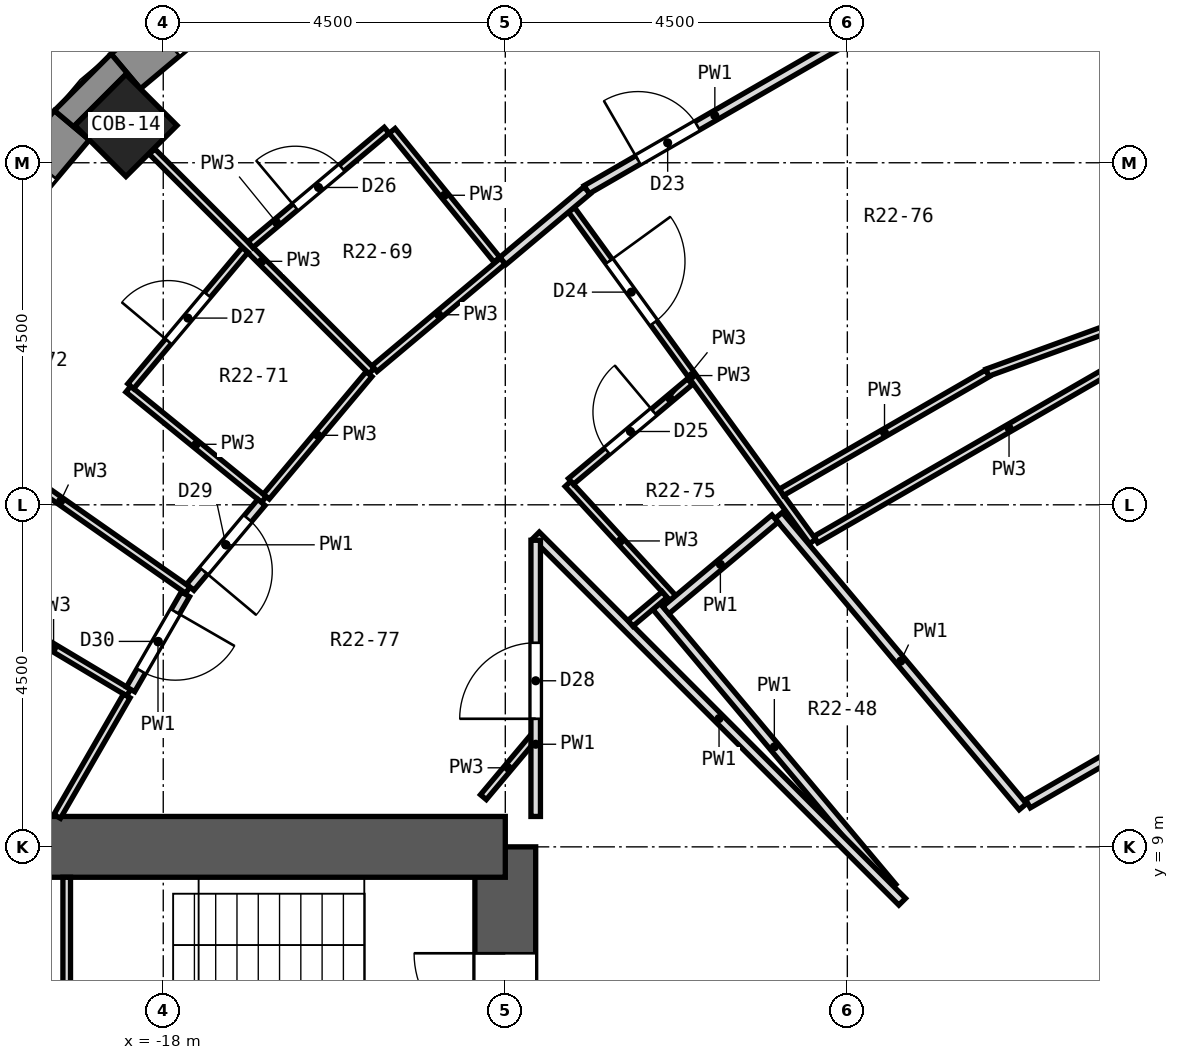
"""IFC4 building model, lengths in metres.
Left out: names, types, materials, properties, quantities, classifications, styles, units other than length and angle.
Written with IfcOpenShell. Run it as: python <this file> out.ifc"""

import sys

from ifc_helpers import new_model, si_unit, direction, frame, frame_2d, origin, origin_2d, place, context, subcontext, project, spatial, polyline, rectangle, outline, extrude, element, fill, save


model = new_model("IFC4")
c1 = context("Model", 3, precision=1e-05, world=origin(), true_north=direction((0.0, 1.0)))
c2 = subcontext(c1, "Body", "Model", "MODEL_VIEW")
j1 = project(units=[si_unit("LENGTHUNIT", "METRE"), si_unit("PLANEANGLEUNIT", "RADIAN")], contexts=[c1])
p1 = place(None, origin())
s1 = spatial("IfcSite", under=j1, at=p1, CompositionType="ELEMENT")
p2 = place(p1, origin())
s2 = spatial("IfcBuilding", under=s1, at=p2, CompositionType="ELEMENT")
p3 = place(p2, frame((0.0, 0.0, 141.4)))
s3 = spatial("IfcBuildingStorey", under=s2, at=p3, CompositionType="ELEMENT", Elevation=141.4)
p4 = place(p3, frame((-18.491, 18.491, 0.0), z_axis=(0.0, 0.0, 1.0), x_axis=(-0.707106781187, 0.707106781187, 0.0)))
e1 = element("IfcColumn", 1, at=p4, inside=s3, PredefinedType="COLUMN", context=c2, shape_type="SweptSolid", body=[
    extrude(rectangle(XDim=0.95, YDim=0.95, at=origin_2d()), origin(), (0.0, 0.0, 1.0), 3.3),
])
p5 = place(p3, frame((-13.5, -9.0, 0.0), z_axis=(0.0, 0.0, 1.0), x_axis=(0.0, 1.0, 0.0)))
e2 = element("IfcWall", 2, at=p5, inside=s3, PredefinedType="SHEAR", context=c2, shape_type="SweptSolid", body=[
    extrude(rectangle(XDim=18.0, YDim=0.8, at=frame_2d((9.0, 0.0))), origin(), (0.0, 0.0, 1.0), 3.3),
])
p6 = place(p5, frame((15.4, 0.0, 0.0)))
e3 = element("IfcOpeningElement", 3, at=p6, cuts=e2, PredefinedType="OPENING", context=c2, shape_type="SweptSolid", body=[
    extrude(rectangle(XDim=1.2, YDim=2.1, at=frame_2d((0.6, 1.05))), frame((0.0, 0.412, 0.0), z_axis=(0.0, -1.0, 0.0), x_axis=(1.0, 0.0, 0.0)), (0.0, 0.0, 1.0), 0.824),
])
p7 = place(p5, frame((1.4, 0.0, 0.0)))
e4 = element("IfcOpeningElement", 4, at=p7, cuts=e2, PredefinedType="OPENING", context=c2, shape_type="SweptSolid", body=[
    extrude(rectangle(XDim=1.2, YDim=2.1, at=frame_2d((0.6, 1.05))), frame((0.0, 0.412, 0.0), z_axis=(0.0, -1.0, 0.0), x_axis=(1.0, 0.0, 0.0)), (0.0, 0.0, 1.0), 0.824),
])
p8 = place(p5, frame((7.5, 0.0, 0.0)))
e5 = element("IfcOpeningElement", 5, at=p8, cuts=e2, PredefinedType="OPENING", context=c2, shape_type="SweptSolid", body=[
    extrude(rectangle(XDim=3.0, YDim=2.4, at=frame_2d((1.5, 1.2))), frame((0.0, 0.412, 0.0), z_axis=(0.0, -1.0, 0.0), x_axis=(1.0, 0.0, 0.0)), (0.0, 0.0, 1.0), 0.824),
])
p9 = place(p3, frame((-13.5, 9.0, 0.0), z_axis=(0.0, 0.0, 1.0), x_axis=(-1.0, 0.0, 0.0)))
e6 = element("IfcWall", 6, at=p9, inside=s3, PredefinedType="SHEAR", context=c2, shape_type="SweptSolid", body=[
    extrude(rectangle(XDim=10.4, YDim=0.8, at=frame_2d((5.2, 0.0))), origin(), (0.0, 0.0, 1.0), 3.3),
])
p10 = place(p3, frame((-15.699, 21.547, 0.0), z_axis=(0.0, 0.0, 1.0), x_axis=(-0.766055462616, -0.642774476932, 0.0)))
e7 = element("IfcWall", 7, at=p10, inside=s3, PredefinedType="SOLIDWALL", context=c2, shape_type="SweptSolid", body=[
    extrude(rectangle(XDim=3.648, YDim=0.6, at=frame_2d((1.824, 0.0))), origin(), (0.0, 0.0, 1.0), 2.8),
])
p11 = place(p10, frame((0.674, 0.0, 0.9)))
e8 = element("IfcOpeningElement", 8, at=p11, cuts=e7, PredefinedType="OPENING", context=c2, shape_type="SweptSolid", body=[
    extrude(rectangle(XDim=2.3, YDim=1.8, at=frame_2d((1.15, 0.9))), frame((0.0, 0.312, 0.0), z_axis=(0.0, -1.0, 0.0), x_axis=(1.0, 0.0, 0.0)), (0.0, 0.0, 1.0), 0.624),
])
p12 = place(p3, frame((-19.202, 18.494, 0.0), z_axis=(0.0, 0.0, 1.0), x_axis=(-0.642774476932, -0.766055462616, 0.0)))
e9 = element("IfcWall", 9, at=p12, inside=s3, PredefinedType="SOLIDWALL", context=c2, shape_type="SweptSolid", body=[
    extrude(rectangle(XDim=3.648, YDim=0.6, at=frame_2d((1.824, 0.0))), origin(), (0.0, 0.0, 1.0), 2.8),
])
p13 = place(p12, frame((0.674, 0.0, 0.9)))
e10 = element("IfcOpeningElement", 10, at=p13, cuts=e9, PredefinedType="OPENING", context=c2, shape_type="SweptSolid", body=[
    extrude(rectangle(XDim=2.3, YDim=1.8, at=frame_2d((1.15, 0.9))), frame((0.0, 0.312, 0.0), z_axis=(0.0, -1.0, 0.0), x_axis=(1.0, 0.0, 0.0)), (0.0, 0.0, 1.0), 0.624),
])
p14 = place(p3, origin())
e11 = element("IfcWall", 11, at=p14, inside=s3, PredefinedType="SOLIDWALL", context=c2, shape_type="SweptSolid", body=[
    extrude(outline(polyline([(-18.686, 19.432), (-19.432, 18.686), (-18.972, 18.301), (-19.163, 18.491), (-18.491, 19.163), (-18.301, 18.972), (-18.686, 19.432)])), origin(), (0.0, 0.0, 1.0), 2.8),
])
p15 = place(p3, frame((-2.527, 8.125, 0.0), z_axis=(0.0, 0.0, 1.0), x_axis=(-0.86604563398, -0.499964958637, 0.0)))
e12 = element("IfcWall", 12, at=p15, inside=s3, PredefinedType="SOLIDWALL", context=c2, shape_type="SweptSolid", body=[
    extrude(rectangle(XDim=3.747, YDim=0.6, at=frame_2d((1.874, 0.0))), origin(), (0.0, 0.0, 1.0), 2.8),
])
p16 = place(p15, frame((0.674, 0.0, 0.9)))
e13 = element("IfcOpeningElement", 13, at=p16, cuts=e12, PredefinedType="OPENING", context=c2, shape_type="SweptSolid", body=[
    extrude(rectangle(XDim=2.4, YDim=1.8, at=frame_2d((1.2, 0.9))), frame((0.0, 0.312, 0.0), z_axis=(0.0, -1.0, 0.0), x_axis=(1.0, 0.0, 0.0)), (0.0, 0.0, 1.0), 0.624),
])
p17 = place(p3, frame((-6.643, 24.791, 0.0), z_axis=(0.0, 0.0, 1.0), x_axis=(0.258629569049, -0.965976576328, 0.0)))
e14 = element("IfcWall", 14, at=p17, inside=s3, PredefinedType="PARTITIONING", context=c2, shape_type="SweptSolid", body=[
    extrude(rectangle(XDim=8.784, YDim=0.15, at=frame_2d((4.392, 0.0))), origin(), (0.0, 0.0, 1.0), 2.8),
])
p18 = place(p3, frame((-12.629, 17.382, 0.0), z_axis=(0.0, 0.0, 1.0), x_axis=(0.587934886014, -0.808908257967, 0.0)))
e15 = element("IfcWall", 15, at=p18, inside=s3, PredefinedType="PARTITIONING", context=c2, shape_type="SweptSolid", body=[
    extrude(rectangle(XDim=5.395, YDim=0.1, at=frame_2d((2.698, 0.0))), origin(), (0.0, 0.0, 1.0), 2.8),
])
p19 = place(p18, frame((0.84, 0.0, 0.0)))
e16 = element("IfcOpeningElement", 16, at=p19, cuts=e15, PredefinedType="OPENING", context=c2, shape_type="SweptSolid", body=[
    extrude(rectangle(XDim=1.0, YDim=2.1, at=frame_2d((0.5, 1.05))), frame((0.0, 0.062, 0.0), z_axis=(0.0, -1.0, 0.0), x_axis=(1.0, 0.0, 0.0)), (0.0, 0.0, 1.0), 0.124),
])
p20 = place(p3, frame((-14.989, 18.419, 0.0), z_axis=(0.0, 0.0, 1.0), x_axis=(0.63124481093, -0.775583643893, 0.0)))
e17 = element("IfcWall", 17, at=p20, inside=s3, PredefinedType="PARTITIONING", context=c2, shape_type="SweptSolid", body=[
    extrude(rectangle(XDim=2.184, YDim=0.1, at=frame_2d((1.092, 0.0))), origin(), (0.0, 0.0, 1.0), 2.8),
])
p21 = place(p3, frame((-11.511, 12.164, 0.0), z_axis=(0.0, 0.0, 1.0), x_axis=(0.64269368401, -0.766123246308, 0.0)))
e18 = element("IfcWall", 18, at=p21, inside=s3, PredefinedType="PARTITIONING", context=c2, shape_type="SweptSolid", body=[
    extrude(rectangle(XDim=4.826, YDim=0.125, at=frame_2d((2.413, 0.0))), origin(), (0.0, 0.0, 1.0), 2.8),
])
p22 = place(p3, frame((-9.904, 13.359, 0.0), z_axis=(0.0, 0.0, 1.0), x_axis=(0.64260671374, -0.766196196451, 0.0)))
e19 = element("IfcWall", 19, at=p22, inside=s3, PredefinedType="PARTITIONING", context=c2, shape_type="SweptSolid", body=[
    extrude(rectangle(XDim=5.0, YDim=0.125, at=frame_2d((2.5, 0.0))), origin(), (0.0, 0.0, 1.0), 2.8),
])
p23 = place(p3, frame((-12.675, 13.776, 0.0), z_axis=(0.0, 0.0, 1.0), x_axis=(0.676672647076, -0.736284000029, 0.0)))
e20 = element("IfcWall", 20, at=p23, inside=s3, PredefinedType="PARTITIONING", context=c2, shape_type="SweptSolid", body=[
    extrude(rectangle(XDim=2.04, YDim=0.1, at=frame_2d((1.02, 0.0))), origin(), (0.0, 0.0, 1.0), 2.8),
])
p24 = place(p3, frame((-18.148, 18.148, 0.0), z_axis=(0.0, 0.0, 1.0), x_axis=(0.707106781187, -0.707106781187, 0.0)))
e21 = element("IfcWall", 21, at=p24, inside=s3, PredefinedType="PARTITIONING", context=c2, shape_type="SweptSolid", body=[
    extrude(rectangle(XDim=4.085, YDim=0.1, at=frame_2d((2.043, 0.0))), origin(), (0.0, 0.0, 1.0), 2.8),
])
p25 = place(p3, frame((-13.097, 13.097, 0.0), z_axis=(0.0, 0.0, 1.0), x_axis=(0.707106781187, -0.707106781187, 0.0)))
e22 = element("IfcWall", 22, at=p25, inside=s3, PredefinedType="PARTITIONING", context=c2, shape_type="SweptSolid", body=[
    extrude(rectangle(XDim=6.815, YDim=0.125, at=frame_2d((3.407, 0.0))), origin(), (0.0, 0.0, 1.0), 2.8),
])
p26 = place(p3, frame((-18.46, 15.022, 0.0), z_axis=(0.0, 0.0, 1.0), x_axis=(0.775591007639, -0.6312357633, 0.0)))
e23 = element("IfcWall", 23, at=p26, inside=s3, PredefinedType="PARTITIONING", context=c2, shape_type="SweptSolid", body=[
    extrude(rectangle(XDim=2.3, YDim=0.1, at=frame_2d((1.15, 0.0))), origin(), (0.0, 0.0, 1.0), 2.8),
])
p27 = place(p3, frame((-21.024, 14.721, 0.0), z_axis=(0.0, 0.0, 1.0), x_axis=(0.819108383097, -0.573638785945, 0.0)))
e24 = element("IfcWall", 24, at=p27, inside=s3, PredefinedType="PARTITIONING", context=c2, shape_type="SweptSolid", body=[
    extrude(rectangle(XDim=4.086, YDim=0.1, at=frame_2d((2.043, 0.0))), origin(), (0.0, 0.0, 1.0), 2.8),
])
p28 = place(p3, frame((-20.43, 12.209, 0.0), z_axis=(0.0, 0.0, 1.0), x_axis=(0.858446574718, -0.512902991174, 0.0)))
e25 = element("IfcWall", 25, at=p28, inside=s3, PredefinedType="PARTITIONING", context=c2, shape_type="SweptSolid", body=[
    extrude(rectangle(XDim=2.301, YDim=0.1, at=frame_2d((1.15, 0.0))), origin(), (0.0, 0.0, 1.0), 2.8),
])
p29 = place(p3, frame((-7.161, 15.238, 0.0), z_axis=(0.0, 0.0, 1.0), x_axis=(0.939722354216, 0.341938440346, 0.0)))
e26 = element("IfcWall", 26, at=p29, inside=s3, PredefinedType="PARTITIONING", context=c2, shape_type="SweptSolid", body=[
    extrude(rectangle(XDim=2.909, YDim=0.1, at=frame_2d((1.455, 0.0))), origin(), (0.0, 0.0, 1.0), 2.8),
])
p30 = place(p3, frame((-6.624, 9.567, 0.0), z_axis=(0.0, 0.0, 1.0), x_axis=(0.865978549379, 0.500081145431, 0.0)))
e27 = element("IfcWall", 27, at=p30, inside=s3, PredefinedType="PARTITIONING", context=c2, shape_type="SweptSolid", body=[
    extrude(rectangle(XDim=1.905, YDim=0.125, at=frame_2d((0.953, 0.0))), origin(), (0.0, 0.0, 1.0), 2.8),
])
p31 = place(p3, frame((-9.414, 13.043, 0.0), z_axis=(0.0, 0.0, 1.0), x_axis=(0.866050468633, 0.499956583896, 0.0)))
e28 = element("IfcWall", 28, at=p31, inside=s3, PredefinedType="PARTITIONING", context=c2, shape_type="SweptSolid", body=[
    extrude(rectangle(XDim=5.867, YDim=0.1, at=frame_2d((2.934, 0.0))), origin(), (0.0, 0.0, 1.0), 2.8),
])
p32 = place(p3, frame((-9.866, 13.666, 0.0), z_axis=(0.0, 0.0, 1.0), x_axis=(0.866045268016, 0.499965592563, 0.0)))
e29 = element("IfcWall", 29, at=p32, inside=s3, PredefinedType="PARTITIONING", context=c2, shape_type="SweptSolid", body=[
    extrude(rectangle(XDim=3.129, YDim=0.1, at=frame_2d((1.564, 0.0))), origin(), (0.0, 0.0, 1.0), 2.8),
])
p33 = place(p3, frame((-12.432, 17.645, 0.0), z_axis=(0.0, 0.0, 1.0), x_axis=(0.866012062527, 0.500023107024, 0.0)))
e30 = element("IfcWall", 30, at=p33, inside=s3, PredefinedType="PARTITIONING", context=c2, shape_type="SweptSolid", body=[
    extrude(rectangle(XDim=3.772, YDim=0.125, at=frame_2d((1.886, 0.0))), origin(), (0.0, 0.0, 1.0), 2.8),
])
p34 = place(p33, frame((0.783, 0.0, 0.0)))
e31 = element("IfcOpeningElement", 31, at=p34, cuts=e30, PredefinedType="OPENING", context=c2, shape_type="SweptSolid", body=[
    extrude(rectangle(XDim=0.9, YDim=2.1, at=frame_2d((0.45, 1.05))), frame((0.0, 0.074, 0.0), z_axis=(0.0, -1.0, 0.0), x_axis=(1.0, 0.0, 0.0)), (0.0, 0.0, 1.0), 0.149),
])
p35 = place(p3, frame((-11.388, 12.114, 0.0), z_axis=(0.0, 0.0, 1.0), x_axis=(0.766199817297, 0.642602396489, 0.0)))
e32 = element("IfcWall", 32, at=p35, inside=s3, PredefinedType="PARTITIONING", context=c2, shape_type="SweptSolid", body=[
    extrude(rectangle(XDim=1.875, YDim=0.125, at=frame_2d((0.937, 0.0))), origin(), (0.0, 0.0, 1.0), 2.8),
])
p36 = place(p3, frame((-11.854, 11.941, 0.0), z_axis=(0.0, 0.0, 1.0), x_axis=(0.765622887771, 0.643289665486, 0.0)))
e33 = element("IfcWall", 33, at=p36, inside=s3, PredefinedType="PARTITIONING", context=c2, shape_type="SweptSolid", body=[
    extrude(rectangle(XDim=0.587, YDim=0.1, at=frame_2d((0.293, 0.0))), origin(), (0.0, 0.0, 1.0), 2.8),
])
p37 = place(p3, frame((-12.637, 13.808, 0.0), z_axis=(0.0, 0.0, 1.0), x_axis=(0.766269322056, 0.64251951416, 0.0)))
e34 = element("IfcWall", 34, at=p37, inside=s3, PredefinedType="PARTITIONING", context=c2, shape_type="SweptSolid", body=[
    extrude(rectangle(XDim=2.044, YDim=0.1, at=frame_2d((1.022, 0.0))), origin(), (0.0, 0.0, 1.0), 2.8),
])
p38 = place(p37, frame((0.622, 0.0, 0.0)))
e35 = element("IfcOpeningElement", 35, at=p38, cuts=e34, PredefinedType="OPENING", context=c2, shape_type="SweptSolid", body=[
    extrude(rectangle(XDim=0.8, YDim=2.1, at=frame_2d((0.4, 1.05))), frame((0.0, 0.062, 0.0), z_axis=(0.0, -1.0, 0.0), x_axis=(1.0, 0.0, 0.0)), (0.0, 0.0, 1.0), 0.124),
])
p39 = place(p3, frame((-15.22, 15.292, 0.0), z_axis=(0.0, 0.0, 1.0), x_axis=(0.766073622953, 0.642752832911, 0.0)))
e36 = element("IfcWall", 36, at=p39, inside=s3, PredefinedType="PARTITIONING", context=c2, shape_type="SweptSolid", body=[
    extrude(rectangle(XDim=2.203, YDim=0.1, at=frame_2d((1.102, 0.0))), origin(), (0.0, 0.0, 1.0), 2.8),
])
p40 = place(p3, frame((-13.532, 16.708, 0.0), z_axis=(0.0, 0.0, 1.0), x_axis=(0.766167387458, 0.642641061866, 0.0)))
e37 = element("IfcWall", 37, at=p40, inside=s3, PredefinedType="PARTITIONING", context=c2, shape_type="SweptSolid", body=[
    extrude(rectangle(XDim=1.445, YDim=0.125, at=frame_2d((0.722, 0.0))), origin(), (0.0, 0.0, 1.0), 2.8),
])
p41 = place(p3, frame((-16.853, 16.923, 0.0), z_axis=(0.0, 0.0, 1.0), x_axis=(0.765924716163, 0.642930267735, 0.0)))
e38 = element("IfcWall", 38, at=p41, inside=s3, PredefinedType="PARTITIONING", context=c2, shape_type="SweptSolid", body=[
    extrude(rectangle(XDim=2.34, YDim=0.1, at=frame_2d((1.17, 0.0))), origin(), (0.0, 0.0, 1.0), 2.8),
])
p42 = place(p41, frame((0.769, 0.0, 0.0)))
e39 = element("IfcOpeningElement", 39, at=p42, cuts=e38, PredefinedType="OPENING", context=c2, shape_type="SweptSolid", body=[
    extrude(rectangle(XDim=0.8, YDim=2.1, at=frame_2d((0.4, 1.05))), frame((0.0, 0.062, 0.0), z_axis=(0.0, -1.0, 0.0), x_axis=(1.0, 0.0, 0.0)), (0.0, 0.0, 1.0), 0.124),
])
p43 = place(p3, frame((-13.788, 9.654, 0.0), z_axis=(0.0, 0.0, 1.0), x_axis=(0.64289662775, 0.765952952881, 0.0)))
e40 = element("IfcWall", 40, at=p43, inside=s3, PredefinedType="PARTITIONING", context=c2, shape_type="SweptSolid", body=[
    extrude(rectangle(XDim=1.008, YDim=0.1, at=frame_2d((0.504, 0.0))), origin(), (0.0, 0.0, 1.0), 2.8),
])
p44 = place(p3, frame((-16.644, 13.608, 0.0), z_axis=(0.0, 0.0, 1.0), x_axis=(0.642715569181, 0.766104886508, 0.0)))
e41 = element("IfcWall", 41, at=p44, inside=s3, PredefinedType="PARTITIONING", context=c2, shape_type="SweptSolid", body=[
    extrude(rectangle(XDim=2.103, YDim=0.1, at=frame_2d((1.052, 0.0))), origin(), (0.0, 0.0, 1.0), 2.8),
])
p45 = place(p3, frame((-17.645, 12.415, 0.0), z_axis=(0.0, 0.0, 1.0), x_axis=(0.642669367872, 0.766143644233, 0.0)))
e42 = element("IfcWall", 42, at=p45, inside=s3, PredefinedType="PARTITIONING", context=c2, shape_type="SweptSolid", body=[
    extrude(rectangle(XDim=1.457, YDim=0.125, at=frame_2d((0.729, 0.0))), origin(), (0.0, 0.0, 1.0), 2.8),
])
p46 = place(p45, frame((0.279, 0.0, 0.0)))
e43 = element("IfcOpeningElement", 43, at=p46, cuts=e42, PredefinedType="OPENING", context=c2, shape_type="SweptSolid", body=[
    extrude(rectangle(XDim=0.9, YDim=2.1, at=frame_2d((0.45, 1.05))), frame((0.0, 0.074, 0.0), z_axis=(0.0, -1.0, 0.0), x_axis=(1.0, 0.0, 0.0)), (0.0, 0.0, 1.0), 0.149),
])
p47 = place(p3, frame((-18.428, 15.06, 0.0), z_axis=(0.0, 0.0, 1.0), x_axis=(0.642930267735, 0.765924716163, 0.0)))
e44 = element("IfcWall", 44, at=p47, inside=s3, PredefinedType="PARTITIONING", context=c2, shape_type="SweptSolid", body=[
    extrude(rectangle(XDim=2.34, YDim=0.1, at=frame_2d((1.17, 0.0))), origin(), (0.0, 0.0, 1.0), 2.8),
])
p48 = place(p47, frame((0.77, 0.0, 0.0)))
e45 = element("IfcOpeningElement", 45, at=p48, cuts=e44, PredefinedType="OPENING", context=c2, shape_type="SweptSolid", body=[
    extrude(rectangle(XDim=0.8, YDim=2.1, at=frame_2d((0.4, 1.05))), frame((0.0, 0.062, 0.0), z_axis=(0.0, -1.0, 0.0), x_axis=(1.0, 0.0, 0.0)), (0.0, 0.0, 1.0), 0.124),
])
p49 = place(p3, frame((-19.396, 9.4, 0.0), z_axis=(0.0, 0.0, 1.0), x_axis=(0.500210961829, 0.865903570651, 0.0)))
e46 = element("IfcWall", 46, at=p49, inside=s3, PredefinedType="PARTITIONING", context=c2, shape_type="SweptSolid", body=[
    extrude(rectangle(XDim=1.831, YDim=0.1, at=frame_2d((0.916, 0.0))), origin(), (0.0, 0.0, 1.0), 2.8),
])
p50 = place(p3, frame((-18.43, 11.072, 0.0), z_axis=(0.0, 0.0, 1.0), x_axis=(0.499849317439, 0.866112382925, 0.0)))
e47 = element("IfcWall", 47, at=p50, inside=s3, PredefinedType="PARTITIONING", context=c2, shape_type="SweptSolid", body=[
    extrude(rectangle(XDim=1.444, YDim=0.125, at=frame_2d((0.722, 0.0))), origin(), (0.0, 0.0, 1.0), 2.8),
])
p51 = place(p50, frame((0.278, 0.0, 0.0)))
e48 = element("IfcOpeningElement", 48, at=p51, cuts=e47, PredefinedType="OPENING", context=c2, shape_type="SweptSolid", body=[
    extrude(rectangle(XDim=0.9, YDim=2.1, at=frame_2d((0.45, 1.05))), frame((0.0, 0.074, 0.0), z_axis=(0.0, -1.0, 0.0), x_axis=(1.0, 0.0, 0.0)), (0.0, 0.0, 1.0), 0.149),
])
p52 = place(p3, frame((-13.1, 9.4, 0.0), z_axis=(0.0, 0.0, 1.0), x_axis=(0.0, 1.0, 0.0)))
e49 = element("IfcWall", 49, at=p52, inside=s3, PredefinedType="PARTITIONING", context=c2, shape_type="SweptSolid", body=[
    extrude(rectangle(XDim=3.634, YDim=0.125, at=frame_2d((1.817, 0.0))), origin(), (0.0, 0.0, 1.0), 2.8),
])
p53 = place(p52, frame((1.285, 0.0, 0.0)))
e50 = element("IfcOpeningElement", 50, at=p53, cuts=e49, PredefinedType="OPENING", context=c2, shape_type="SweptSolid", body=[
    extrude(rectangle(XDim=1.0, YDim=2.1, at=frame_2d((0.5, 1.05))), frame((0.0, 0.074, 0.0), z_axis=(0.0, -1.0, 0.0), x_axis=(1.0, 0.0, 0.0)), (0.0, 0.0, 1.0), 0.149),
])
p54 = place(p3, frame((-19.27, 5.25, 0.0), z_axis=(0.0, 0.0, 1.0), x_axis=(0.0, 1.0, 0.0)))
e51 = element("IfcWall", 51, at=p54, inside=s3, PredefinedType="PARTITIONING", context=c2, shape_type="SweptSolid", body=[
    extrude(rectangle(XDim=3.35, YDim=0.1, at=frame_2d((1.675, 0.0))), origin(), (0.0, 0.0, 1.0), 2.8),
])
p55 = place(p34, origin())
e52 = element("IfcDoor", 52, at=p55, inside=s3, OperationType="SINGLE_SWING_LEFT", PredefinedType="DOOR", context=c2, shape_type="SweptSolid", body=[
    extrude(rectangle(XDim=0.9, YDim=2.1, at=frame_2d((0.45, 1.05))), frame((0.0, 0.025, 0.0), z_axis=(0.0, -1.0, 0.0), x_axis=(1.0, 0.0, 0.0)), (0.0, 0.0, 1.0), 0.05),
])
fill(e31, e52)
p56 = place(p19, origin())
e53 = element("IfcDoor", 53, at=p56, inside=s3, OperationType="SINGLE_SWING_LEFT", PredefinedType="DOOR", context=c2, shape_type="SweptSolid", body=[
    extrude(rectangle(XDim=1.0, YDim=2.1, at=frame_2d((0.5, 1.05))), frame((0.0, 0.025, 0.0), z_axis=(0.0, -1.0, 0.0), x_axis=(1.0, 0.0, 0.0)), (0.0, 0.0, 1.0), 0.05),
])
fill(e16, e53)
p57 = place(p38, origin())
e54 = element("IfcDoor", 54, at=p57, inside=s3, OperationType="SINGLE_SWING_RIGHT", PredefinedType="DOOR", context=c2, shape_type="SweptSolid", body=[
    extrude(rectangle(XDim=0.8, YDim=2.1, at=frame_2d((0.4, 1.05))), frame((0.0, 0.025, 0.0), z_axis=(0.0, -1.0, 0.0), x_axis=(1.0, 0.0, 0.0)), (0.0, 0.0, 1.0), 0.05),
])
fill(e35, e54)
p58 = place(p42, origin())
e55 = element("IfcDoor", 55, at=p58, inside=s3, OperationType="SINGLE_SWING_LEFT", PredefinedType="DOOR", context=c2, shape_type="SweptSolid", body=[
    extrude(rectangle(XDim=0.8, YDim=2.1, at=frame_2d((0.4, 1.05))), frame((0.0, 0.025, 0.0), z_axis=(0.0, -1.0, 0.0), x_axis=(1.0, 0.0, 0.0)), (0.0, 0.0, 1.0), 0.05),
])
fill(e39, e55)
p59 = place(p48, origin())
e56 = element("IfcDoor", 56, at=p59, inside=s3, OperationType="SINGLE_SWING_LEFT", PredefinedType="DOOR", context=c2, shape_type="SweptSolid", body=[
    extrude(rectangle(XDim=0.8, YDim=2.1, at=frame_2d((0.4, 1.05))), frame((0.0, 0.025, 0.0), z_axis=(0.0, -1.0, 0.0), x_axis=(1.0, 0.0, 0.0)), (0.0, 0.0, 1.0), 0.05),
])
fill(e45, e56)
p60 = place(p53, origin())
e57 = element("IfcDoor", 57, at=p60, inside=s3, OperationType="SINGLE_SWING_LEFT", PredefinedType="DOOR", context=c2, shape_type="SweptSolid", body=[
    extrude(rectangle(XDim=1.0, YDim=2.1, at=frame_2d((0.5, 1.05))), frame((0.0, 0.025, 0.0), z_axis=(0.0, -1.0, 0.0), x_axis=(1.0, 0.0, 0.0)), (0.0, 0.0, 1.0), 0.05),
])
fill(e50, e57)
p61 = place(p46, frame((0.9, 0.0, 0.0), z_axis=(0.0, 0.0, 1.0), x_axis=(-1.0, 0.0, 0.0)))
e58 = element("IfcDoor", 58, at=p61, inside=s3, OperationType="SINGLE_SWING_RIGHT", PredefinedType="DOOR", context=c2, shape_type="SweptSolid", body=[
    extrude(rectangle(XDim=0.9, YDim=2.1, at=frame_2d((0.45, 1.05))), frame((0.0, 0.025, 0.0), z_axis=(0.0, -1.0, 0.0), x_axis=(1.0, 0.0, 0.0)), (0.0, 0.0, 1.0), 0.05),
])
fill(e43, e58)
p62 = place(p51, frame((0.9, 0.0, 0.0), z_axis=(0.0, 0.0, 1.0), x_axis=(-1.0, 0.0, 0.0)))
e59 = element("IfcDoor", 59, at=p62, inside=s3, OperationType="SINGLE_SWING_LEFT", PredefinedType="DOOR", context=c2, shape_type="SweptSolid", body=[
    extrude(rectangle(XDim=0.9, YDim=2.1, at=frame_2d((0.45, 1.05))), frame((0.0, 0.025, 0.0), z_axis=(0.0, -1.0, 0.0), x_axis=(1.0, 0.0, 0.0)), (0.0, 0.0, 1.0), 0.05),
])
fill(e48, e59)
p63 = place(p6, origin())
e60 = element("IfcDoor", 60, at=p63, inside=s3, OperationType="SINGLE_SWING_RIGHT", PredefinedType="DOOR", context=c2, shape_type="SweptSolid", body=[
    extrude(rectangle(XDim=1.2, YDim=2.1, at=frame_2d((0.6, 1.05))), frame((0.0, 0.025, 0.0), z_axis=(0.0, -1.0, 0.0), x_axis=(1.0, 0.0, 0.0)), (0.0, 0.0, 1.0), 0.05),
])
fill(e3, e60)
save(model, sys.argv[1])
